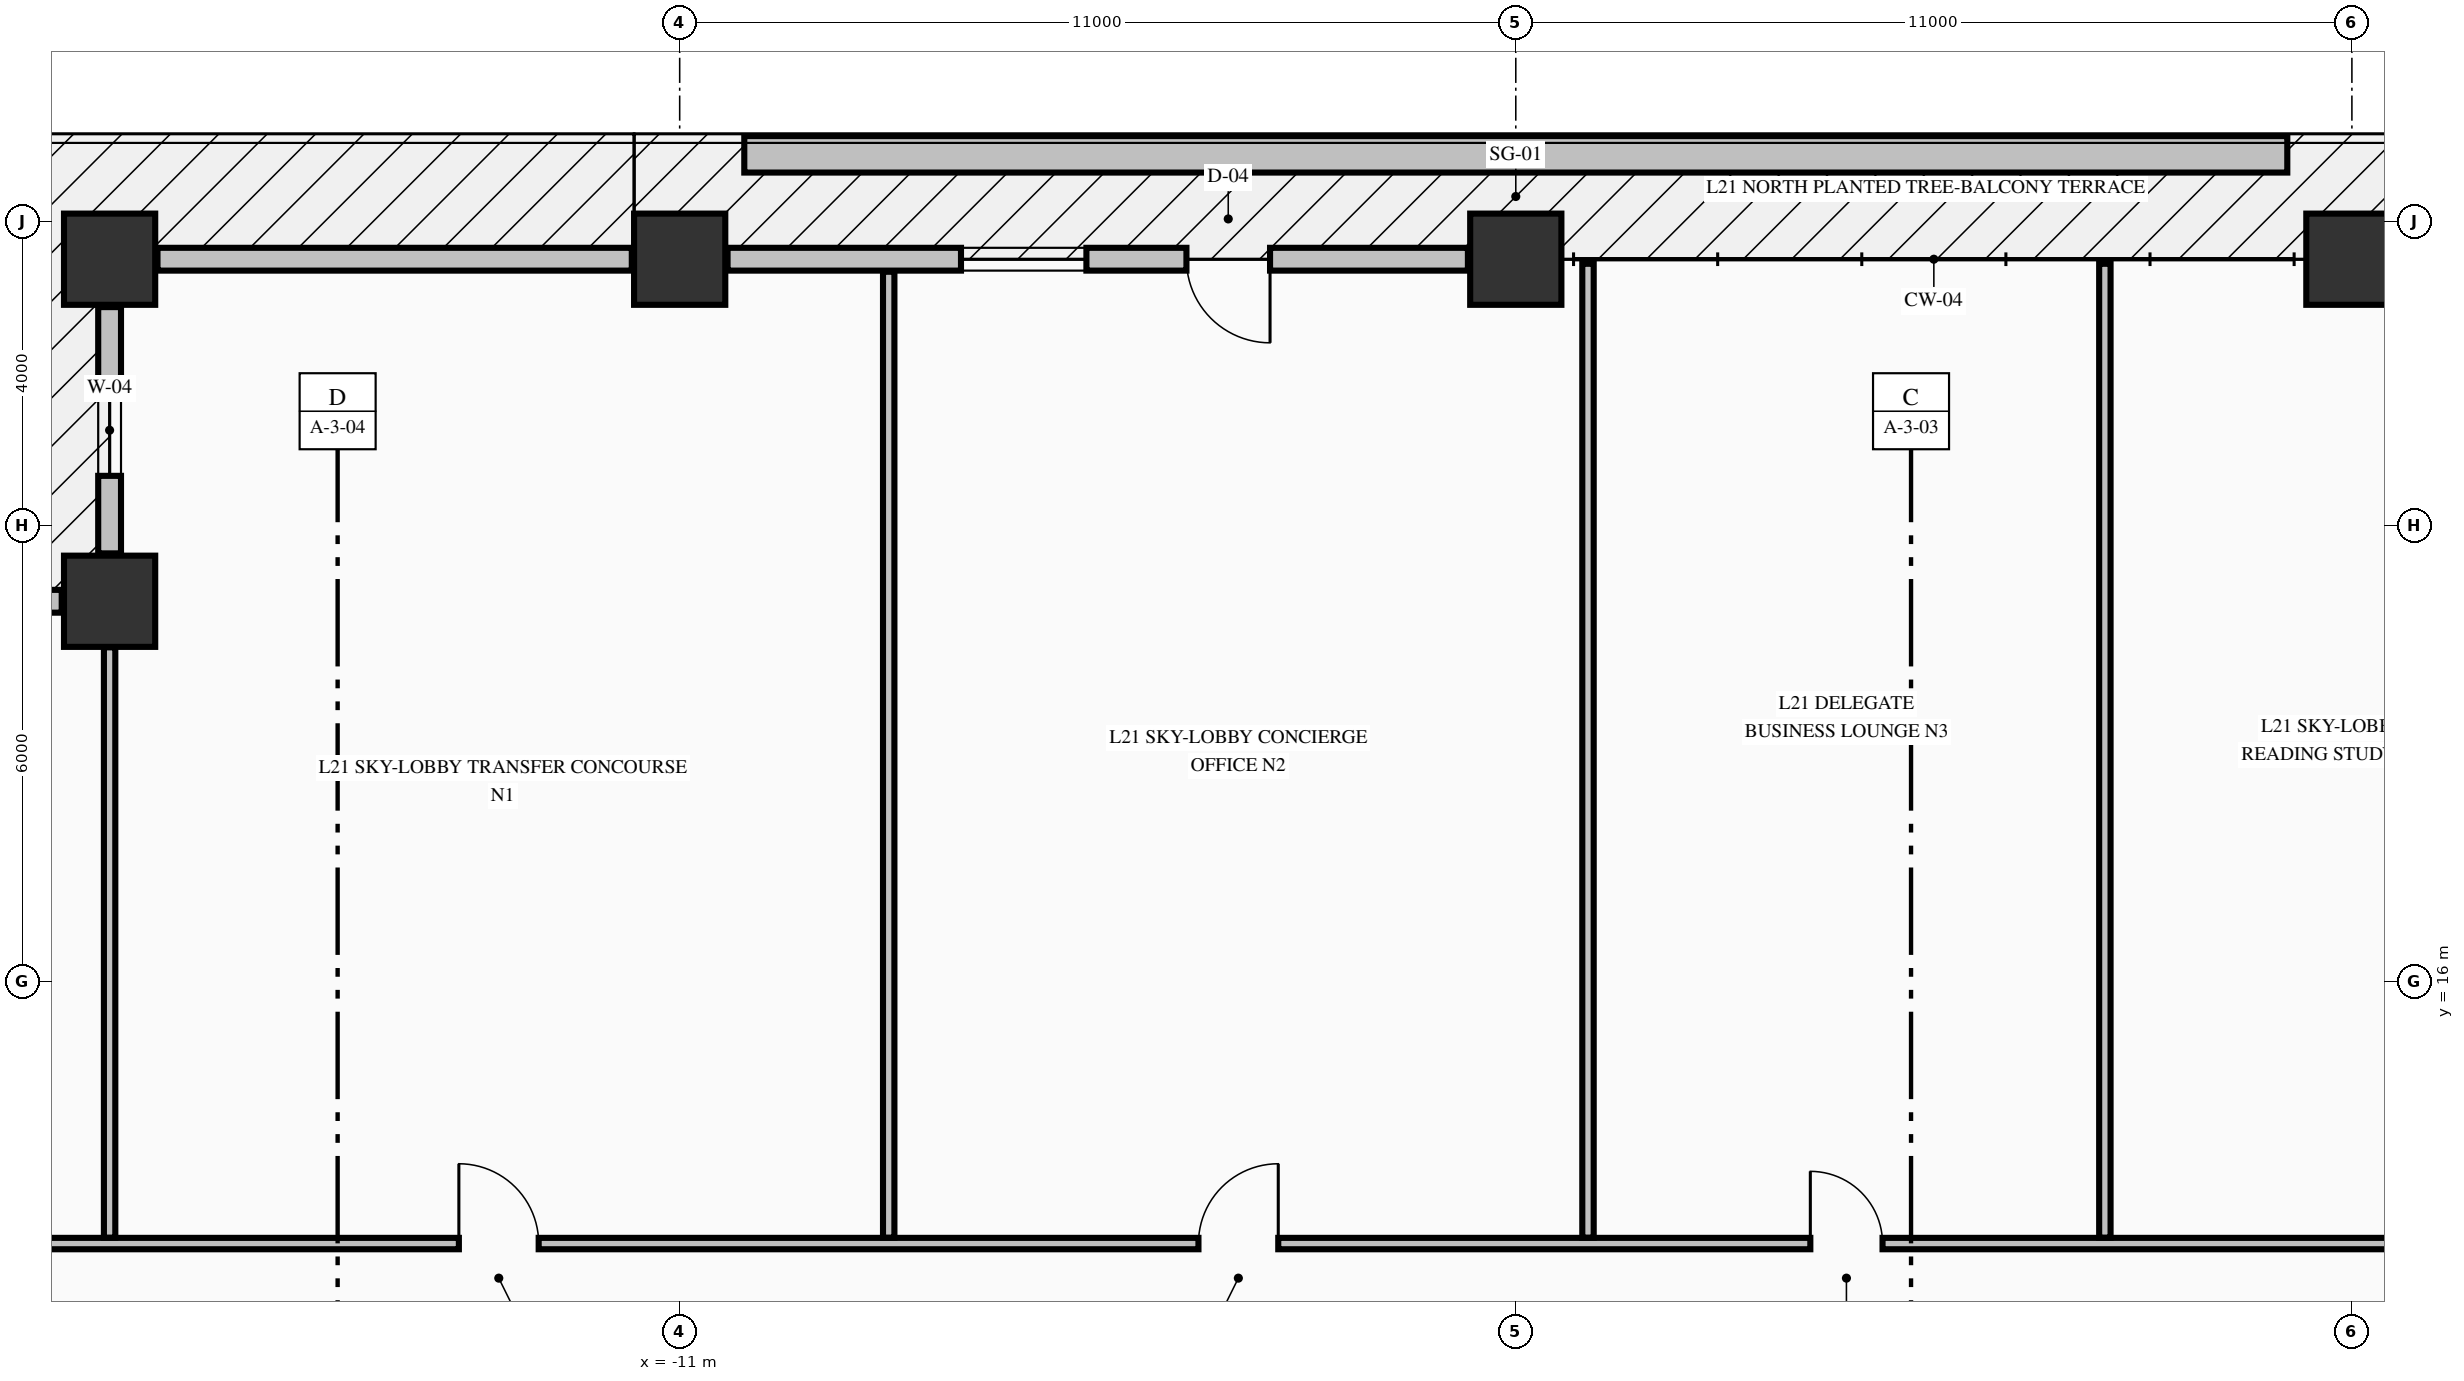
"""IFC4 building model, lengths in metres.
Left out: names, types, materials, properties, quantities, classifications, styles, units other than length and angle.
Written with IfcOpenShell. Run it as: python <this file> out.ifc"""

import sys

from ifc_helpers import new_model, si_unit, direction, frame, frame_2d, origin, origin_2d, place, context, subcontext, project, spatial, rectangle, extrude, element, fill, save


model = new_model("IFC4")
c1 = context("Model", 3, precision=1e-05, world=origin(), true_north=direction((0.0, 1.0)))
c2 = subcontext(c1, "Body", "Model", "MODEL_VIEW")
j1 = project(units=[si_unit("LENGTHUNIT", "METRE"), si_unit("PLANEANGLEUNIT", "RADIAN")], contexts=[c1])
p1 = place(None, origin())
s1 = spatial("IfcSite", under=j1, at=p1, CompositionType="ELEMENT")
p2 = place(p1, origin())
s2 = spatial("IfcBuilding", under=s1, at=p2, CompositionType="ELEMENT")
p3 = place(p2, frame((0.0, 0.0, 86.94)))
s3 = spatial("IfcBuildingStorey", under=s2, at=p3, CompositionType="ELEMENT", Elevation=86.94)
for number, where, z_axis, x_axis in (
    (1, (-18.5, 25.5, -0.425), (0.0, 0.0, 1.0), (1.0, 0.0, 0.0)),
    (2, (-11.0, 25.5, -0.425), (0.0, 0.0, 1.0), (1.0, 0.0, 0.0)),
    (3, (0.0, 25.5, -0.425), (0.0, 0.0, 1.0), (1.0, 0.0, 0.0)),
    (4, (11.0, 25.5, -0.425), (0.0, 0.0, 1.0), (1.0, 0.0, 0.0)),
    (5, (-18.5, 21.0, -0.425), (0.0, 0.0, 1.0), (1.0, 0.0, 0.0)),
):
    element("IfcColumn", number, at=place(p3, frame(where, z_axis=z_axis, x_axis=x_axis)), inside=s3, PredefinedType="COLUMN", context=c2, shape_type="SweptSolid", body=[
        extrude(rectangle(XDim=1.2, YDim=1.2, at=origin_2d()), origin(), (0.0, 0.0, 1.0), 4.595),
    ])
p4 = place(p3, frame((-18.5, 24.87, 0.0), z_axis=(0.0, 0.0, 1.0), x_axis=(0.0, -1.0, 0.0)))
e6 = element("IfcWall", 6, at=p4, inside=s3, PredefinedType="STANDARD", context=c2, shape_type="SweptSolid", body=[
    extrude(rectangle(XDim=3.24, YDim=0.3, at=frame_2d((1.62, 0.0))), origin(), (0.0, 0.0, 1.0), 3.562),
])
p5 = place(p4, frame((1.02, 0.0, 0.82)))
e7 = element("IfcOpeningElement", 7, at=p5, cuts=e6, PredefinedType="OPENING", context=c2, shape_type="SweptSolid", body=[
    extrude(rectangle(XDim=1.2, YDim=1.65, at=frame_2d((0.6, 0.825))), frame((0.0, 0.16, 0.0), z_axis=(0.0, -1.0, 0.0), x_axis=(1.0, 0.0, 0.0)), (0.0, 0.0, 1.0), 0.32),
])
p6 = place(p3, frame((-19.13, 21.0, 0.0), z_axis=(0.0, 0.0, 1.0), x_axis=(-1.0, 0.0, 0.0)))
e8 = element("IfcWall", 8, at=p6, inside=s3, PredefinedType="STANDARD", context=c2, shape_type="SweptSolid", body=[
    extrude(rectangle(XDim=3.24, YDim=0.3, at=frame_2d((1.62, 0.0))), origin(), (0.0, 0.0, 1.0), 3.562),
])
p7 = place(p6, frame((1.02, 0.0, 0.82)))
e9 = element("IfcOpeningElement", 9, at=p7, cuts=e8, PredefinedType="OPENING", context=c2, shape_type="SweptSolid", body=[
    extrude(rectangle(XDim=1.2, YDim=1.65, at=frame_2d((0.6, 0.825))), frame((0.0, 0.16, 0.0), z_axis=(0.0, -1.0, 0.0), x_axis=(1.0, 0.0, 0.0)), (0.0, 0.0, 1.0), 0.32),
])
p8 = place(p3, frame((-11.63, 25.5, 0.0), z_axis=(0.0, 0.0, 1.0), x_axis=(-1.0, 0.0, 0.0)))
e10 = element("IfcWall", 10, at=p8, inside=s3, PredefinedType="STANDARD", context=c2, shape_type="SweptSolid", body=[
    extrude(rectangle(XDim=6.24, YDim=0.3, at=frame_2d((3.12, 0.0))), origin(), (0.0, 0.0, 1.0), 3.562),
])
p9 = place(p3, frame((-0.63, 25.5, 0.0), z_axis=(0.0, 0.0, 1.0), x_axis=(-1.0, 0.0, 0.0)))
e11 = element("IfcWall", 11, at=p9, inside=s3, PredefinedType="STANDARD", context=c2, shape_type="SweptSolid", body=[
    extrude(rectangle(XDim=9.74, YDim=0.3, at=frame_2d((4.87, 0.0))), origin(), (0.0, 0.0, 1.0), 3.562),
])
p10 = place(p9, frame((2.603, 0.0, 0.0)))
e12 = element("IfcOpeningElement", 12, at=p10, cuts=e11, PredefinedType="OPENING", context=c2, shape_type="SweptSolid", body=[
    extrude(rectangle(XDim=1.1, YDim=2.15, at=frame_2d((0.55, 1.075))), frame((0.0, 0.16, 0.0), z_axis=(0.0, -1.0, 0.0), x_axis=(1.0, 0.0, 0.0)), (0.0, 0.0, 1.0), 0.32),
])
p11 = place(p9, frame((5.019, 0.0, 0.8)))
e13 = element("IfcOpeningElement", 13, at=p11, cuts=e11, PredefinedType="OPENING", context=c2, shape_type="SweptSolid", body=[
    extrude(rectangle(XDim=1.65, YDim=1.7, at=frame_2d((0.825, 0.85))), frame((0.0, 0.16, 0.0), z_axis=(0.0, -1.0, 0.0), x_axis=(1.0, 0.0, 0.0)), (0.0, 0.0, 1.0), 0.32),
])
p12 = place(p3, frame((-22.835, 12.55, 0.0), z_axis=(0.0, 0.0, 1.0), x_axis=(1.0, 0.0, 0.0)))
e14 = element("IfcWall", 14, at=p12, inside=s3, PredefinedType="PARTITIONING", context=c2, shape_type="SweptSolid", body=[
    extrude(rectangle(XDim=50.67, YDim=0.15, at=frame_2d((25.335, 0.0))), origin(), (0.0, 0.0, 1.0), 4.17),
])
p13 = place(p12, frame((8.93, 0.0, 0.0)))
e15 = element("IfcOpeningElement", 15, at=p13, cuts=e14, PredefinedType="OPENING", context=c2, shape_type="SweptSolid", body=[
    extrude(rectangle(XDim=1.05, YDim=2.15, at=frame_2d((0.525, 1.075))), frame((0.0, 0.085, 0.0), z_axis=(0.0, -1.0, 0.0), x_axis=(1.0, 0.0, 0.0)), (0.0, 0.0, 1.0), 0.17),
])
p14 = place(p12, frame((18.66, 0.0, 0.0)))
e16 = element("IfcOpeningElement", 16, at=p14, cuts=e14, PredefinedType="OPENING", context=c2, shape_type="SweptSolid", body=[
    extrude(rectangle(XDim=1.05, YDim=2.15, at=frame_2d((0.525, 1.075))), frame((0.0, 0.085, 0.0), z_axis=(0.0, -1.0, 0.0), x_axis=(1.0, 0.0, 0.0)), (0.0, 0.0, 1.0), 0.17),
])
p15 = place(p12, frame((26.71, 0.0, 0.0)))
e17 = element("IfcOpeningElement", 17, at=p15, cuts=e14, PredefinedType="OPENING", context=c2, shape_type="SweptSolid", body=[
    extrude(rectangle(XDim=0.95, YDim=2.15, at=frame_2d((0.475, 1.075))), frame((0.0, 0.085, 0.0), z_axis=(0.0, -1.0, 0.0), x_axis=(1.0, 0.0, 0.0)), (0.0, 0.0, 1.0), 0.17),
])
p16 = place(p12, frame((34.46, 0.0, 0.0)))
e18 = element("IfcOpeningElement", 18, at=p16, cuts=e14, PredefinedType="OPENING", context=c2, shape_type="SweptSolid", body=[
    extrude(rectangle(XDim=0.95, YDim=2.15, at=frame_2d((0.475, 1.075))), frame((0.0, 0.085, 0.0), z_axis=(0.0, -1.0, 0.0), x_axis=(1.0, 0.0, 0.0)), (0.0, 0.0, 1.0), 0.17),
])
p17 = place(p12, frame((39.08, 0.0, 0.0)))
e19 = element("IfcOpeningElement", 19, at=p17, cuts=e14, PredefinedType="OPENING", context=c2, shape_type="SweptSolid", body=[
    extrude(rectangle(XDim=1.05, YDim=2.15, at=frame_2d((0.525, 1.075))), frame((0.0, 0.085, 0.0), z_axis=(0.0, -1.0, 0.0), x_axis=(1.0, 0.0, 0.0)), (0.0, 0.0, 1.0), 0.17),
])
p18 = place(p3, frame((-18.5, 12.628, 0.0), z_axis=(0.0, 0.0, 1.0), x_axis=(0.0, 1.0, 0.0)))
e20 = element("IfcWall", 20, at=p18, inside=s3, PredefinedType="PARTITIONING", context=c2, shape_type="SweptSolid", body=[
    extrude(rectangle(XDim=7.766, YDim=0.15, at=frame_2d((3.883, 0.0))), origin(), (0.0, 0.0, 1.0), 4.17),
])
p19 = place(p3, frame((-8.25, 12.628, 0.0), z_axis=(0.0, 0.0, 1.0), x_axis=(0.0, 1.0, 0.0)))
e21 = element("IfcWall", 21, at=p19, inside=s3, PredefinedType="PARTITIONING", context=c2, shape_type="SweptSolid", body=[
    extrude(rectangle(XDim=12.707, YDim=0.15, at=frame_2d((6.354, 0.0))), origin(), (0.0, 0.0, 1.0), 4.17),
])
for number, where, z_axis, x_axis in (
    (22, (0.95, 12.628, 0.0), (0.0, 0.0, 1.0), (0.0, 1.0, 0.0)),
    (23, (7.75, 12.628, 0.0), (0.0, 0.0, 1.0), (0.0, 1.0, 0.0)),
):
    element("IfcWall", number, at=place(p3, frame(where, z_axis=z_axis, x_axis=x_axis)), inside=s3, PredefinedType="PARTITIONING", context=c2, shape_type="SweptSolid", body=[
        extrude(rectangle(XDim=12.812, YDim=0.15, at=frame_2d((6.406, 0.0))), origin(), (0.0, 0.0, 1.0), 4.17),
    ])
p20 = place(p3, frame((-10.15, 26.88, -0.04), z_axis=(0.0, 0.0, 1.0), x_axis=(1.0, 0.0, 0.0)))
e24 = element("IfcWall", 24, at=p20, inside=s3, PredefinedType="PARAPET", context=c2, shape_type="SweptSolid", body=[
    extrude(rectangle(XDim=20.3, YDim=0.48, at=frame_2d((10.15, 0.0))), origin(), (0.0, 0.0, 1.0), 0.52),
])
p21 = place(p5, origin())
e25 = element("IfcWindow", 25, at=p21, inside=s3, PartitioningType="SINGLE_PANEL", PredefinedType="WINDOW", context=c2, shape_type="SweptSolid", body=[
    extrude(rectangle(XDim=1.2, YDim=1.65, at=frame_2d((0.6, 0.825))), frame((0.0, 0.03, 0.0), z_axis=(0.0, -1.0, 0.0), x_axis=(1.0, 0.0, 0.0)), (0.0, 0.0, 1.0), 0.06),
])
fill(e7, e25)
p22 = place(p10, origin())
e26 = element("IfcDoor", 26, at=p22, inside=s3, OperationType="SINGLE_SWING_LEFT", PredefinedType="DOOR", context=c2, shape_type="SweptSolid", body=[
    extrude(rectangle(XDim=1.1, YDim=2.15, at=frame_2d((0.55, 1.075))), frame((0.0, 0.025, 0.0), z_axis=(0.0, -1.0, 0.0), x_axis=(1.0, 0.0, 0.0)), (0.0, 0.0, 1.0), 0.05),
])
fill(e12, e26)
p23 = place(p11, origin())
e27 = element("IfcWindow", 27, at=p23, inside=s3, PartitioningType="SINGLE_PANEL", PredefinedType="WINDOW", context=c2, shape_type="SweptSolid", body=[
    extrude(rectangle(XDim=1.65, YDim=1.7, at=frame_2d((0.825, 0.85))), frame((0.0, 0.03, 0.0), z_axis=(0.0, -1.0, 0.0), x_axis=(1.0, 0.0, 0.0)), (0.0, 0.0, 1.0), 0.06),
])
fill(e13, e27)
p24 = place(p13, origin())
e28 = element("IfcDoor", 28, at=p24, inside=s3, OperationType="SINGLE_SWING_LEFT", PredefinedType="DOOR", context=c2, shape_type="SweptSolid", body=[
    extrude(rectangle(XDim=1.05, YDim=2.15, at=frame_2d((0.525, 1.075))), frame((0.0, 0.025, 0.0), z_axis=(0.0, -1.0, 0.0), x_axis=(1.0, 0.0, 0.0)), (0.0, 0.0, 1.0), 0.05),
])
fill(e15, e28)
p25 = place(p14, origin())
e29 = element("IfcDoor", 29, at=p25, inside=s3, OperationType="SINGLE_SWING_RIGHT", PredefinedType="DOOR", context=c2, shape_type="SweptSolid", body=[
    extrude(rectangle(XDim=1.05, YDim=2.15, at=frame_2d((0.525, 1.075))), frame((0.0, 0.025, 0.0), z_axis=(0.0, -1.0, 0.0), x_axis=(1.0, 0.0, 0.0)), (0.0, 0.0, 1.0), 0.05),
])
fill(e16, e29)
p26 = place(p15, origin())
e30 = element("IfcDoor", 30, at=p26, inside=s3, OperationType="SINGLE_SWING_LEFT", PredefinedType="DOOR", context=c2, shape_type="SweptSolid", body=[
    extrude(rectangle(XDim=0.95, YDim=2.15, at=frame_2d((0.475, 1.075))), frame((0.0, 0.025, 0.0), z_axis=(0.0, -1.0, 0.0), x_axis=(1.0, 0.0, 0.0)), (0.0, 0.0, 1.0), 0.05),
])
fill(e17, e30)
save(model, sys.argv[1])
